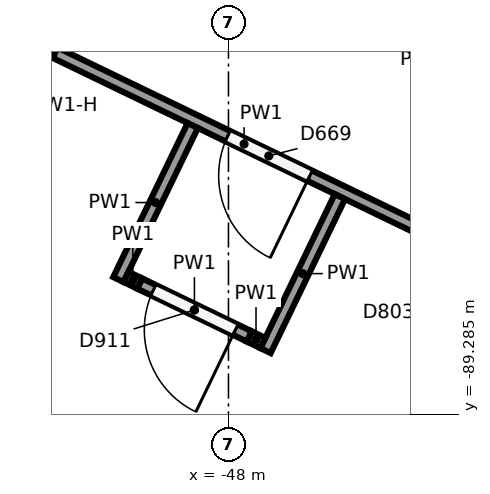
"""IFC4 building model, lengths in metres.
Left out: names, types, materials, properties, quantities, classifications, styles, units other than length and angle.
Written with IfcOpenShell. Run it as: python <this file> out.ifc"""

import sys

from ifc_helpers import new_model, si_unit, direction, frame, frame_2d, origin, place, context, subcontext, project, spatial, rectangle, extrude, element, fill, save


model = new_model("IFC4")
c1 = context("Model", 3, precision=1e-05, world=origin(), true_north=direction((0.0, 1.0)))
c2 = subcontext(c1, "Body", "Model", "MODEL_VIEW")
j1 = project(units=[si_unit("LENGTHUNIT", "METRE"), si_unit("PLANEANGLEUNIT", "RADIAN")], contexts=[c1])
p1 = place(None, origin())
s1 = spatial("IfcSite", under=j1, at=p1, CompositionType="ELEMENT")
p2 = place(p1, origin())
s2 = spatial("IfcBuilding", under=s1, at=p2, CompositionType="ELEMENT")
p3 = place(p2, frame((0.0, 0.0, 6.5)))
s3 = spatial("IfcBuildingStorey", under=s2, at=p3, CompositionType="ELEMENT", Elevation=6.5)
p4 = place(p3, frame((-45.308, -86.931, 0.0), z_axis=(0.0, 0.0, 1.0), x_axis=(-0.90052298219, 0.434808415911, 0.0)))
e1 = element("IfcWall", 1, at=p4, inside=s3, PredefinedType="PARTITIONING", context=c2, shape_type="SweptSolid", body=[
    extrude(rectangle(XDim=5.522, YDim=0.15, at=frame_2d((2.761, 0.0))), origin(), (0.0, 0.0, 1.0), 5.15),
])
p5 = place(p4, frame((1.8, 0.0, 0.0)))
e2 = element("IfcOpeningElement", 2, at=p5, cuts=e1, PredefinedType="OPENING", context=c2, shape_type="SweptSolid", body=[
    extrude(rectangle(XDim=1.2, YDim=2.1, at=frame_2d((0.6, 1.05))), frame((0.0, 0.085, 0.0), z_axis=(0.0, -1.0, 0.0), x_axis=(1.0, 0.0, 0.0)), (0.0, 0.0, 1.0), 0.17),
])
for number, where, z_axis, x_axis in (
    (3, (-46.534, -86.423, 0.0), (0.0, 0.0, 1.0), (-0.435, -0.901, 0.0)),
    (4, (-48.47, -85.488, 0.0), (0.0, 0.0, 1.0), (-0.435, -0.901, 0.0)),
):
    element("IfcWall", number, at=place(p3, frame(where, z_axis=z_axis, x_axis=x_axis)), inside=s3, PredefinedType="PARTITIONING", context=c2, shape_type="SweptSolid", body=[
        extrude(rectangle(XDim=2.25, YDim=0.15, at=frame_2d((1.125, 0.0))), origin(), (0.0, 0.0, 1.0), 5.15),
    ])
p6 = place(p3, frame((-47.547, -88.349, 0.0), z_axis=(0.0, 0.0, 1.0), x_axis=(-0.900205528442, 0.435465275954, 0.0)))
e5 = element("IfcWall", 5, at=p6, inside=s3, PredefinedType="PARTITIONING", context=c2, shape_type="SweptSolid", body=[
    extrude(rectangle(XDim=0.2, YDim=0.15, at=frame_2d((0.1, 0.0))), origin(), (0.0, 0.0, 1.0), 5.15),
])
p7 = place(p3, frame((-47.728, -88.262, 0.0), z_axis=(0.0, 0.0, 1.0), x_axis=(-0.90053721394, 0.434778939589, 0.0)))
e6 = element("IfcWall", 6, at=p7, inside=s3, PredefinedType="PARTITIONING", context=c2, shape_type="SweptSolid", body=[
    extrude(rectangle(XDim=1.6, YDim=0.15, at=frame_2d((0.8, 0.0))), origin(), (0.0, 0.0, 1.0), 5.15),
])
p8 = place(p7, frame((0.2, 0.0, 0.0)))
e7 = element("IfcOpeningElement", 7, at=p8, cuts=e6, PredefinedType="OPENING", context=c2, shape_type="SweptSolid", body=[
    extrude(rectangle(XDim=1.2, YDim=2.1, at=frame_2d((0.6, 1.05))), frame((0.0, 0.085, 0.0), z_axis=(0.0, -1.0, 0.0), x_axis=(1.0, 0.0, 0.0)), (0.0, 0.0, 1.0), 0.17),
])
p9 = place(p3, frame((-49.168, -87.566, 0.0), z_axis=(0.0, 0.0, 1.0), x_axis=(-0.900205528442, 0.435465275954, 0.0)))
e8 = element("IfcWall", 8, at=p9, inside=s3, PredefinedType="PARTITIONING", context=c2, shape_type="SweptSolid", body=[
    extrude(rectangle(XDim=0.2, YDim=0.15, at=frame_2d((0.1, 0.0))), origin(), (0.0, 0.0, 1.0), 5.15),
])
p10 = place(p5, origin())
e9 = element("IfcDoor", 9, at=p10, inside=s3, OperationType="SINGLE_SWING_LEFT", PredefinedType="DOOR", context=c2, shape_type="SweptSolid", body=[
    extrude(rectangle(XDim=1.2, YDim=2.1, at=frame_2d((0.6, 1.05))), frame((0.0, 0.025, 0.0), z_axis=(0.0, -1.0, 0.0), x_axis=(1.0, 0.0, 0.0)), (0.0, 0.0, 1.0), 0.05),
])
fill(e2, e9)
p11 = place(p8, origin())
e10 = element("IfcDoor", 10, at=p11, inside=s3, OperationType="SINGLE_SWING_LEFT", PredefinedType="DOOR", context=c2, shape_type="SweptSolid", body=[
    extrude(rectangle(XDim=1.2, YDim=2.1, at=frame_2d((0.6, 1.05))), frame((0.0, 0.025, 0.0), z_axis=(0.0, -1.0, 0.0), x_axis=(1.0, 0.0, 0.0)), (0.0, 0.0, 1.0), 0.05),
])
fill(e7, e10)
save(model, sys.argv[1])
